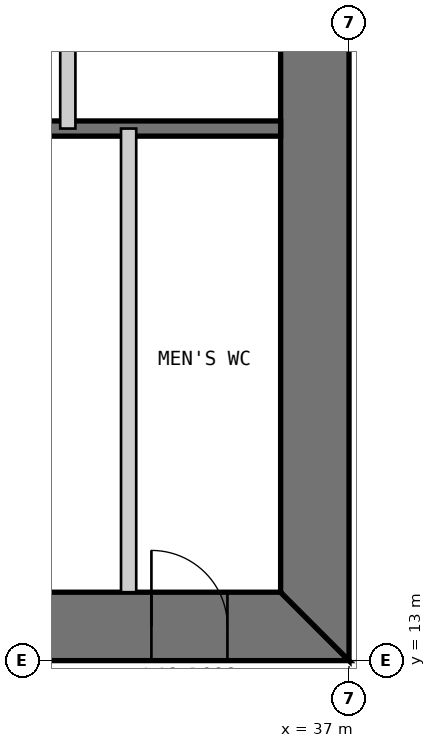
"""IFC4 building model, lengths in metres.
Left out: names, types, materials, properties, quantities, classifications, styles, units other than length and angle.
Written with IfcOpenShell. Run it as: python <this file> out.ifc"""

import sys

from ifc_helpers import new_model, si_unit, direction, frame, frame_2d, origin, place, context, subcontext, project, spatial, polyline, rectangle, outline, extrude, element, fill, save


model = new_model("IFC4")
c1 = context("Model", 3, precision=1e-05, world=origin(), true_north=direction((0.0, 1.0)))
c2 = subcontext(c1, "Body", "Model", "MODEL_VIEW")
j1 = project(units=[si_unit("LENGTHUNIT", "METRE"), si_unit("PLANEANGLEUNIT", "RADIAN")], contexts=[c1])
p1 = place(None, origin())
s1 = spatial("IfcSite", under=j1, at=p1, CompositionType="ELEMENT")
p2 = place(p1, origin())
s2 = spatial("IfcBuilding", under=s1, at=p2, CompositionType="ELEMENT")
p3 = place(p2, frame((0.0, 0.0, 197.8)))
s3 = spatial("IfcBuildingStorey", under=s2, at=p3, CompositionType="ELEMENT", Elevation=197.8)
p4 = place(p3, frame((13.0, 13.45, 0.0), z_axis=(0.0, 0.0, 1.0), x_axis=(1.0, 0.0, 0.0)))
e1 = element("IfcWall", 1, at=p4, inside=s3, PredefinedType="SHEAR", context=c2, shape_type="SweptSolid", body=[
    extrude(outline(polyline([(0.0, -0.45), (24.0, -0.45), (23.1, 0.45), (0.9, 0.45), (0.0, -0.45)])), origin(), (0.0, 0.0, 1.0), 4.0),
])
p5 = place(p4, frame((4.9, 0.0, 0.0)))
e2 = element("IfcOpeningElement", 2, at=p5, cuts=e1, PredefinedType="OPENING", context=c2, shape_type="SweptSolid", body=[
    extrude(rectangle(XDim=1.0, YDim=2.2, at=frame_2d((0.5, 1.1))), frame((0.0, 0.46, 0.0), z_axis=(0.0, -1.0, 0.0), x_axis=(1.0, 0.0, 0.0)), (0.0, 0.0, 1.0), 0.92),
])
p6 = place(p4, frame((8.9, 0.0, 0.0)))
e3 = element("IfcOpeningElement", 3, at=p6, cuts=e1, PredefinedType="OPENING", context=c2, shape_type="SweptSolid", body=[
    extrude(rectangle(XDim=1.1, YDim=2.2, at=frame_2d((0.55, 1.1))), frame((0.0, 0.46, 0.0), z_axis=(0.0, -1.0, 0.0), x_axis=(1.0, 0.0, 0.0)), (0.0, 0.0, 1.0), 0.92),
])
p7 = place(p4, frame((15.05, 0.0, 0.0)))
e4 = element("IfcOpeningElement", 4, at=p7, cuts=e1, PredefinedType="OPENING", context=c2, shape_type="SweptSolid", body=[
    extrude(rectangle(XDim=0.9, YDim=2.2, at=frame_2d((0.45, 1.1))), frame((0.0, 0.46, 0.0), z_axis=(0.0, -1.0, 0.0), x_axis=(1.0, 0.0, 0.0)), (0.0, 0.0, 1.0), 0.92),
])
p8 = place(p4, frame((17.9, 0.0, 0.0)))
e5 = element("IfcOpeningElement", 5, at=p8, cuts=e1, PredefinedType="OPENING", context=c2, shape_type="SweptSolid", body=[
    extrude(rectangle(XDim=1.0, YDim=2.2, at=frame_2d((0.5, 1.1))), frame((0.0, 0.46, 0.0), z_axis=(0.0, -1.0, 0.0), x_axis=(1.0, 0.0, 0.0)), (0.0, 0.0, 1.0), 0.92),
])
p9 = place(p4, frame((21.4, 0.0, 0.0)))
e6 = element("IfcOpeningElement", 6, at=p9, cuts=e1, PredefinedType="OPENING", context=c2, shape_type="SweptSolid", body=[
    extrude(rectangle(XDim=1.0, YDim=2.2, at=frame_2d((0.5, 1.1))), frame((0.0, 0.46, 0.0), z_axis=(0.0, -1.0, 0.0), x_axis=(1.0, 0.0, 0.0)), (0.0, 0.0, 1.0), 0.92),
])
p10 = place(p3, frame((36.55, 13.9, 0.0), z_axis=(0.0, 0.0, 1.0), x_axis=(0.0, 1.0, 0.0)))
e7 = element("IfcWall", 7, at=p10, inside=s3, PredefinedType="SHEAR", context=c2, shape_type="SweptSolid", body=[
    extrude(outline(polyline([(-0.9, -0.45), (23.1, -0.45), (22.2, 0.45), (0.0, 0.45), (-0.9, -0.45)])), origin(), (0.0, 0.0, 1.0), 4.0),
])
p11 = place(p10, frame((20.2, 0.0, 0.0)))
e8 = element("IfcOpeningElement", 8, at=p11, cuts=e7, PredefinedType="OPENING", context=c2, shape_type="SweptSolid", body=[
    extrude(rectangle(XDim=1.0, YDim=2.2, at=frame_2d((0.5, 1.1))), frame((0.0, 0.46, 0.0), z_axis=(0.0, -1.0, 0.0), x_axis=(1.0, 0.0, 0.0)), (0.0, 0.0, 1.0), 0.92),
])
p12 = place(p10, frame((17.25, 0.0, 0.0)))
e9 = element("IfcOpeningElement", 9, at=p12, cuts=e7, PredefinedType="OPENING", context=c2, shape_type="SweptSolid", body=[
    extrude(rectangle(XDim=0.9, YDim=2.2, at=frame_2d((0.45, 1.1))), frame((0.0, 0.46, 0.0), z_axis=(0.0, -1.0, 0.0), x_axis=(1.0, 0.0, 0.0)), (0.0, 0.0, 1.0), 0.92),
])
p13 = place(p3, frame((20.3, 20.0, 0.0), z_axis=(0.0, 0.0, 1.0), x_axis=(1.0, 0.0, 0.0)))
e10 = element("IfcWall", 10, at=p13, inside=s3, PredefinedType="SOLIDWALL", context=c2, shape_type="SweptSolid", body=[
    extrude(rectangle(XDim=15.8, YDim=0.2, at=frame_2d((7.9, 0.0))), origin(), (0.0, 0.0, 1.0), 3.8),
])
p14 = place(p3, frame((34.1, 13.9, 0.0), z_axis=(0.0, 0.0, 1.0), x_axis=(0.0, 1.0, 0.0)))
e11 = element("IfcWall", 11, at=p14, inside=s3, PredefinedType="PARTITIONING", context=c2, shape_type="SweptSolid", body=[
    extrude(rectangle(XDim=6.1, YDim=0.2, at=frame_2d((3.05, 0.0))), origin(), (0.0, 0.0, 1.0), 3.8),
])
p15 = place(p3, frame((33.3, 36.1, 0.0), z_axis=(0.0, 0.0, 1.0), x_axis=(0.0, -1.0, 0.0)))
e12 = element("IfcWall", 12, at=p15, inside=s3, PredefinedType="PARTITIONING", context=c2, shape_type="SweptSolid", body=[
    extrude(rectangle(XDim=16.1, YDim=0.2, at=frame_2d((8.05, 0.0))), origin(), (0.0, 0.0, 1.0), 3.8),
])
p16 = place(p15, frame((3.8, 0.0, 0.0)))
e13 = element("IfcOpeningElement", 13, at=p16, cuts=e12, PredefinedType="OPENING", context=c2, shape_type="SweptSolid", body=[
    extrude(rectangle(XDim=0.9, YDim=2.2, at=frame_2d((0.45, 1.1))), frame((0.0, 0.11, 0.0), z_axis=(0.0, -1.0, 0.0), x_axis=(1.0, 0.0, 0.0)), (0.0, 0.0, 1.0), 0.22),
])
p17 = place(p9, origin())
e14 = element("IfcDoor", 14, at=p17, inside=s3, OperationType="SINGLE_SWING_LEFT", PredefinedType="DOOR", context=c2, shape_type="SweptSolid", body=[
    extrude(rectangle(XDim=1.0, YDim=2.2, at=frame_2d((0.5, 1.1))), frame((0.0, 0.025, 0.0), z_axis=(0.0, -1.0, 0.0), x_axis=(1.0, 0.0, 0.0)), (0.0, 0.0, 1.0), 0.05),
    extrude(outline(polyline([(0.0, 0.0), (0.04, 0.0), (0.04, 2.16), (0.96, 2.16), (0.96, 0.0), (1.0, 0.0), (1.0, 2.2), (0.0, 2.2), (0.0, 0.0)])), frame((0.0, 0.3, 0.0), z_axis=(0.0, -1.0, 0.0), x_axis=(1.0, 0.0, 0.0)), (0.0, 0.0, 1.0), 0.6),
])
fill(e6, e14)
save(model, sys.argv[1])
